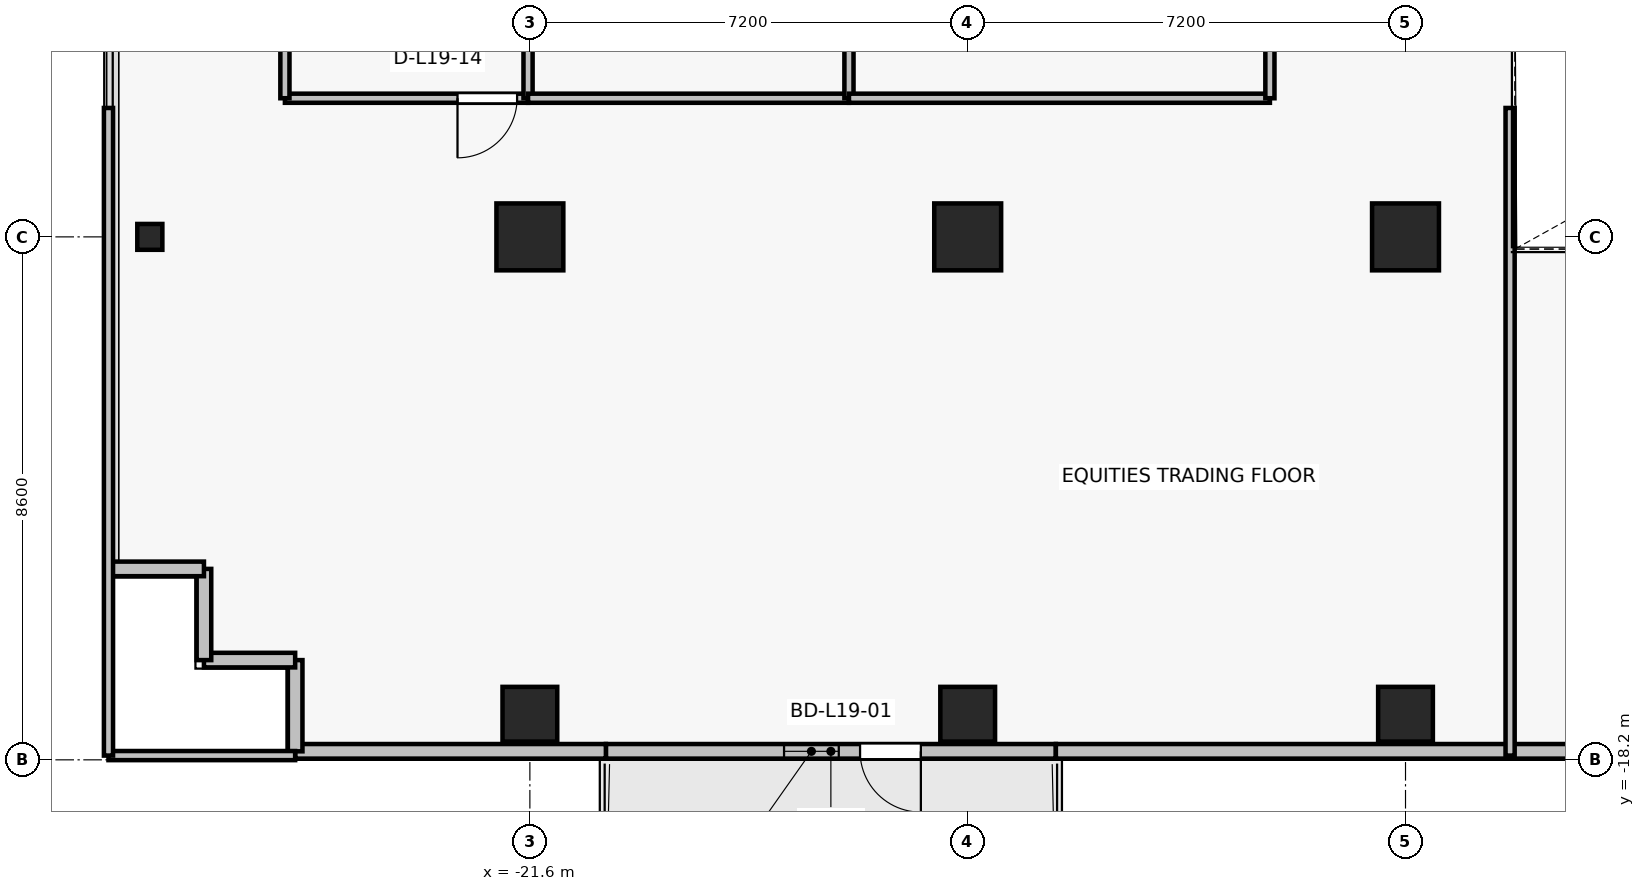
"""IFC4 building model, lengths in metres.
Left out: names, types, materials, properties, quantities, classifications, styles, units other than length and angle.
Written with IfcOpenShell. Run it as: python <this file> out.ifc"""

import sys

from ifc_helpers import new_model, si_unit, direction, frame, frame_2d, origin, origin_2d, place, context, subcontext, project, spatial, rectangle, i_section, extrude, source, transform, mapped, element, fill, save


model = new_model("IFC4")
c1 = context("Model", 3, precision=1e-05, world=origin(), true_north=direction((0.0, 1.0)))
c2 = subcontext(c1, "Body", "Model", "MODEL_VIEW")
j1 = project(units=[si_unit("LENGTHUNIT", "METRE"), si_unit("PLANEANGLEUNIT", "RADIAN")], contexts=[c1])
p1 = place(None, origin())
s1 = spatial("IfcSite", under=j1, at=p1, CompositionType="ELEMENT")
p2 = place(p1, origin())
s2 = spatial("IfcBuilding", under=s1, at=p2, CompositionType="ELEMENT")
p3 = place(p2, frame((0.0, 0.0, 70.3)))
s3 = spatial("IfcBuildingStorey", under=s2, at=p3, CompositionType="ELEMENT", Elevation=70.3)
for number, where, z_axis, x_axis in (
    (1, (-14.4, -9.6, 0.0), (0.0, 0.0, 1.0), (1.0, 0.0, 0.0)),
    (2, (-7.2, -9.6, 0.0), (0.0, 0.0, 1.0), (1.0, 0.0, 0.0)),
    (3, (-21.6, -9.6, 0.0), (0.0, 0.0, 1.0), (1.0, 0.0, 0.0)),
):
    element("IfcColumn", number, at=place(p3, frame(where, z_axis=z_axis, x_axis=x_axis)), inside=s3, PredefinedType="COLUMN", context=c2, shape_type="SweptSolid", body=[
        extrude(rectangle(XDim=1.1, YDim=1.1, at=origin_2d()), origin(), (0.0, 0.0, 1.0), 3.3),
    ])
for number, where, z_axis, x_axis in (
    (4, (-14.4, -17.45, 0.0), (0.0, 0.0, 1.0), (1.0, 0.0, 0.0)),
    (5, (-7.2, -17.45, 0.0), (0.0, 0.0, 1.0), (1.0, 0.0, 0.0)),
    (6, (-21.6, -17.45, 0.0), (0.0, 0.0, 1.0), (1.0, 0.0, 0.0)),
):
    element("IfcColumn", number, at=place(p3, frame(where, z_axis=z_axis, x_axis=x_axis)), inside=s3, PredefinedType="COLUMN", context=c2, shape_type="SweptSolid", body=[
        extrude(rectangle(XDim=0.9, YDim=0.9, at=origin_2d()), origin(), (0.0, 0.0, 1.0), 3.3),
    ])
p4 = place(p3, frame((-27.85, -9.6, 0.0), z_axis=(0.0, 0.0, 1.0), x_axis=(1.0, 0.0, 0.0)))
e7 = element("IfcColumn", 7, at=p4, inside=s3, PredefinedType="COLUMN", context=c2, shape_type="SweptSolid", body=[
    extrude(i_section(OverallWidth=0.412, OverallDepth=0.425, WebThickness=0.026, FlangeThickness=0.039, FilletRadius=0.015, at=origin_2d()), origin(), (0.0, 0.0, 1.0), 3.3),
])
p5 = place(p3, frame((-12.95, -18.06, 0.0), z_axis=(0.0, 0.0, 1.0), x_axis=(-1.0, 0.0, 0.0)))
e8 = element("IfcWall", 8, at=p5, inside=s3, PredefinedType="SOLIDWALL", context=c2, shape_type="SweptSolid", body=[
    extrude(rectangle(XDim=7.4, YDim=0.24, at=frame_2d((3.7, 0.0))), origin(), (0.0, 0.0, 1.0), 2.665),
])
p6 = place(p5, frame((2.22, 0.0, 0.0)))
e9 = element("IfcOpeningElement", 9, at=p6, cuts=e8, PredefinedType="OPENING", context=c2, shape_type="SweptSolid", body=[
    extrude(rectangle(XDim=1.0, YDim=2.2, at=frame_2d((0.5, 1.1))), frame((0.0, 0.13, 0.0), z_axis=(0.0, -1.0, 0.0), x_axis=(1.0, 0.0, 0.0)), (0.0, 0.0, 1.0), 0.26),
])
p7 = place(p5, frame((3.57, 0.0, 0.85)))
e10 = element("IfcOpeningElement", 10, at=p7, cuts=e8, PredefinedType="OPENING", context=c2, shape_type="SweptSolid", body=[
    extrude(rectangle(XDim=0.9, YDim=1.35, at=frame_2d((0.45, 0.675))), frame((0.0, 0.13, 0.0), z_axis=(0.0, -1.0, 0.0), x_axis=(1.0, 0.0, 0.0)), (0.0, 0.0, 1.0), 0.26),
])
p8 = place(p3, frame((-12.95, -18.06, 0.0), z_axis=(0.0, 0.0, 1.0), x_axis=(1.0, 0.0, 0.0)))
e11 = element("IfcWall", 11, at=p8, inside=s3, PredefinedType="SOLIDWALL", context=c2, shape_type="SweptSolid", body=[
    extrude(rectangle(XDim=9.61, YDim=0.24, at=frame_2d((4.805, 0.0))), origin(), (0.0, 0.0, 1.0), 2.665),
])
p9 = place(p3, frame((-25.46, -18.06, 0.0), z_axis=(0.0, 0.0, 1.0), x_axis=(1.0, 0.0, 0.0)))
e12 = element("IfcWall", 12, at=p9, inside=s3, PredefinedType="SOLIDWALL", context=c2, shape_type="SweptSolid", body=[
    extrude(rectangle(XDim=5.11, YDim=0.24, at=frame_2d((2.555, 0.0))), origin(), (0.0, 0.0, 1.0), 3.075),
])
for number, where, z_axis, x_axis in (
    (13, (-25.46, -16.56, 0.0), (0.0, 0.0, 1.0), (0.0, -1.0, 0.0)),
    (14, (-26.96, -16.56, 0.0), (0.0, 0.0, 1.0), (1.0, 0.0, 0.0)),
    (15, (-26.96, -15.06, 0.0), (0.0, 0.0, 1.0), (0.0, -1.0, 0.0)),
    (16, (-28.46, -15.06, 0.0), (0.0, 0.0, 1.0), (1.0, 0.0, 0.0)),
):
    element("IfcWall", number, at=place(p3, frame(where, z_axis=z_axis, x_axis=x_axis)), inside=s3, PredefinedType="SOLIDWALL", context=c2, shape_type="SweptSolid", body=[
        extrude(rectangle(XDim=1.5, YDim=0.24, at=frame_2d((0.75, 0.0))), origin(), (0.0, 0.0, 1.0), 3.075),
    ])
p10 = place(p3, frame((-21.63, -7.32, 0.0), z_axis=(0.0, 0.0, 1.0), x_axis=(-1.0, 0.0, 0.0)))
e17 = element("IfcWall", 17, at=p10, inside=s3, PredefinedType="PARTITIONING", context=c2, shape_type="SweptSolid", body=[
    extrude(rectangle(XDim=3.998, YDim=0.15, at=frame_2d((1.999, 0.0))), origin(), (0.0, 0.0, 1.0), 2.465),
])
p11 = place(p10, frame((0.18, 0.0, 0.0)))
e18 = element("IfcOpeningElement", 18, at=p11, cuts=e17, PredefinedType="OPENING", context=c2, shape_type="SweptSolid", body=[
    extrude(rectangle(XDim=0.98, YDim=2.15, at=frame_2d((0.49, 1.075))), frame((0.0, 0.085, 0.0), z_axis=(0.0, -1.0, 0.0), x_axis=(1.0, 0.0, 0.0)), (0.0, 0.0, 1.0), 0.17),
])
p12 = place(p3, frame((-25.628, -7.32, 0.0), z_axis=(0.0, 0.0, 1.0), x_axis=(0.0, 1.0, 0.0)))
e19 = element("IfcWall", 19, at=p12, inside=s3, PredefinedType="PARTITIONING", context=c2, shape_type="SweptSolid", body=[
    extrude(rectangle(XDim=3.49, YDim=0.15, at=frame_2d((1.745, 0.0))), origin(), (0.0, 0.0, 1.0), 2.565),
])
p13 = place(p3, frame((-21.63, -3.83, 0.0), z_axis=(0.0, 0.0, 1.0), x_axis=(0.0, -1.0, 0.0)))
e20 = element("IfcWall", 20, at=p13, inside=s3, PredefinedType="PARTITIONING", context=c2, shape_type="SweptSolid", body=[
    extrude(rectangle(XDim=3.49, YDim=0.15, at=frame_2d((1.745, 0.0))), origin(), (0.0, 0.0, 1.0), 2.465),
])
p14 = place(p3, frame((-16.353, -7.32, 0.0), z_axis=(0.0, 0.0, 1.0), x_axis=(-1.0, 0.0, 0.0)))
e21 = element("IfcWall", 21, at=p14, inside=s3, PredefinedType="PARTITIONING", context=c2, shape_type="SweptSolid", body=[
    extrude(rectangle(XDim=5.278, YDim=0.15, at=frame_2d((2.639, 0.0))), origin(), (0.0, 0.0, 1.0), 2.465),
])
p15 = place(p3, frame((-16.353, -3.83, 0.0), z_axis=(0.0, 0.0, 1.0), x_axis=(0.0, -1.0, 0.0)))
e22 = element("IfcWall", 22, at=p15, inside=s3, PredefinedType="PARTITIONING", context=c2, shape_type="SweptSolid", body=[
    extrude(rectangle(XDim=3.49, YDim=0.15, at=frame_2d((1.745, 0.0))), origin(), (0.0, 0.0, 1.0), 2.565),
])
p16 = place(p3, frame((-9.43, -7.32, 0.0), z_axis=(0.0, 0.0, 1.0), x_axis=(-1.0, 0.0, 0.0)))
e23 = element("IfcWall", 23, at=p16, inside=s3, PredefinedType="PARTITIONING", context=c2, shape_type="SweptSolid", body=[
    extrude(rectangle(XDim=6.923, YDim=0.15, at=frame_2d((3.461, 0.0))), origin(), (0.0, 0.0, 1.0), 2.465),
])
p17 = place(p3, frame((-9.43, -3.83, 0.0), z_axis=(0.0, 0.0, 1.0), x_axis=(0.0, -1.0, 0.0)))
e24 = element("IfcWall", 24, at=p17, inside=s3, PredefinedType="PARTITIONING", context=c2, shape_type="SweptSolid", body=[
    extrude(rectangle(XDim=3.49, YDim=0.15, at=frame_2d((1.745, 0.0))), origin(), (0.0, 0.0, 1.0), 2.565),
])
p18 = place(p3, frame((-25.46, -18.13, 0.0), z_axis=(0.0, 0.0, 1.0), x_axis=(-1.0, 0.0, 0.0)))
e25 = element("IfcWall", 25, at=p18, inside=s3, PredefinedType="PARTITIONING", context=c2, shape_type="SweptSolid", body=[
    extrude(rectangle(XDim=3.07, YDim=0.15, at=frame_2d((1.535, 0.0))), origin(), (0.0, 0.0, 1.0), 2.665),
])
p19 = place(p3, frame((-28.53, -18.13, 0.0), z_axis=(0.0, 0.0, 1.0), x_axis=(0.0, 1.0, 0.0)))
e26 = element("IfcWall", 26, at=p19, inside=s3, PredefinedType="PARTITIONING", context=c2, shape_type="SweptSolid", body=[
    extrude(rectangle(XDim=10.65, YDim=0.15, at=frame_2d((5.325, 0.0))), origin(), (0.0, 0.0, 1.0), 2.665),
])
p20 = place(p3, frame((-5.48, -7.48, 0.0), z_axis=(0.0, 0.0, 1.0), x_axis=(0.0, -1.0, 0.0)))
e27 = element("IfcWall", 27, at=p20, inside=s3, PredefinedType="PARTITIONING", context=c2, shape_type="SweptSolid", body=[
    extrude(rectangle(XDim=10.65, YDim=0.15, at=frame_2d((5.325, 0.0))), origin(), (0.0, 0.0, 1.0), 2.465),
])
m1 = source(origin(), c2, "Body", "SweptSolid", [
    extrude(rectangle(XDim=1.0, YDim=2.2, at=frame_2d((0.5, 1.1))), frame((0.0, 0.025, 0.0), z_axis=(0.0, -1.0, 0.0), x_axis=(1.0, 0.0, 0.0)), (0.0, 0.0, 1.0), 0.05),
])
p21 = place(p6, origin())
e28 = element("IfcDoor", 28, at=p21, inside=s3, OperationType="SINGLE_SWING_LEFT", PredefinedType="DOOR", context=c2, shape_type="MappedRepresentation", body=[
    mapped(m1, transform((0.0, 0.0, 0.0), x_axis=(1.0, 0.0, 0.0), y_axis=(0.0, 1.0, 0.0), z_axis=(0.0, 0.0, 1.0), scale=1.0)),
])
fill(e9, e28)
m2 = source(origin(), c2, "Body", "SweptSolid", [
    extrude(rectangle(XDim=0.9, YDim=1.35, at=frame_2d((0.45, 0.675))), frame((0.0, 0.03, 0.0), z_axis=(0.0, -1.0, 0.0), x_axis=(1.0, 0.0, 0.0)), (0.0, 0.0, 1.0), 0.06),
])
p22 = place(p7, origin())
e29 = element("IfcWindow", 29, at=p22, inside=s3, PartitioningType="SINGLE_PANEL", PredefinedType="WINDOW", context=c2, shape_type="MappedRepresentation", body=[
    mapped(m2, transform((0.0, 0.0, 0.0), x_axis=(1.0, 0.0, 0.0), y_axis=(0.0, 1.0, 0.0), z_axis=(0.0, 0.0, 1.0), scale=1.0)),
])
fill(e10, e29)
m3 = source(origin(), c2, "Body", "SweptSolid", [
    extrude(rectangle(XDim=0.98, YDim=2.15, at=frame_2d((0.49, 1.075))), frame((0.0, 0.025, 0.0), z_axis=(0.0, -1.0, 0.0), x_axis=(1.0, 0.0, 0.0)), (0.0, 0.0, 1.0), 0.05),
])
p23 = place(p11, origin())
e30 = element("IfcDoor", 30, at=p23, inside=s3, OperationType="SINGLE_SWING_RIGHT", PredefinedType="DOOR", context=c2, shape_type="MappedRepresentation", body=[
    mapped(m3, transform((0.0, 0.0, 0.0), x_axis=(1.0, 0.0, 0.0), y_axis=(0.0, 1.0, 0.0), z_axis=(0.0, 0.0, 1.0), scale=1.0)),
])
fill(e18, e30)
save(model, sys.argv[1])
